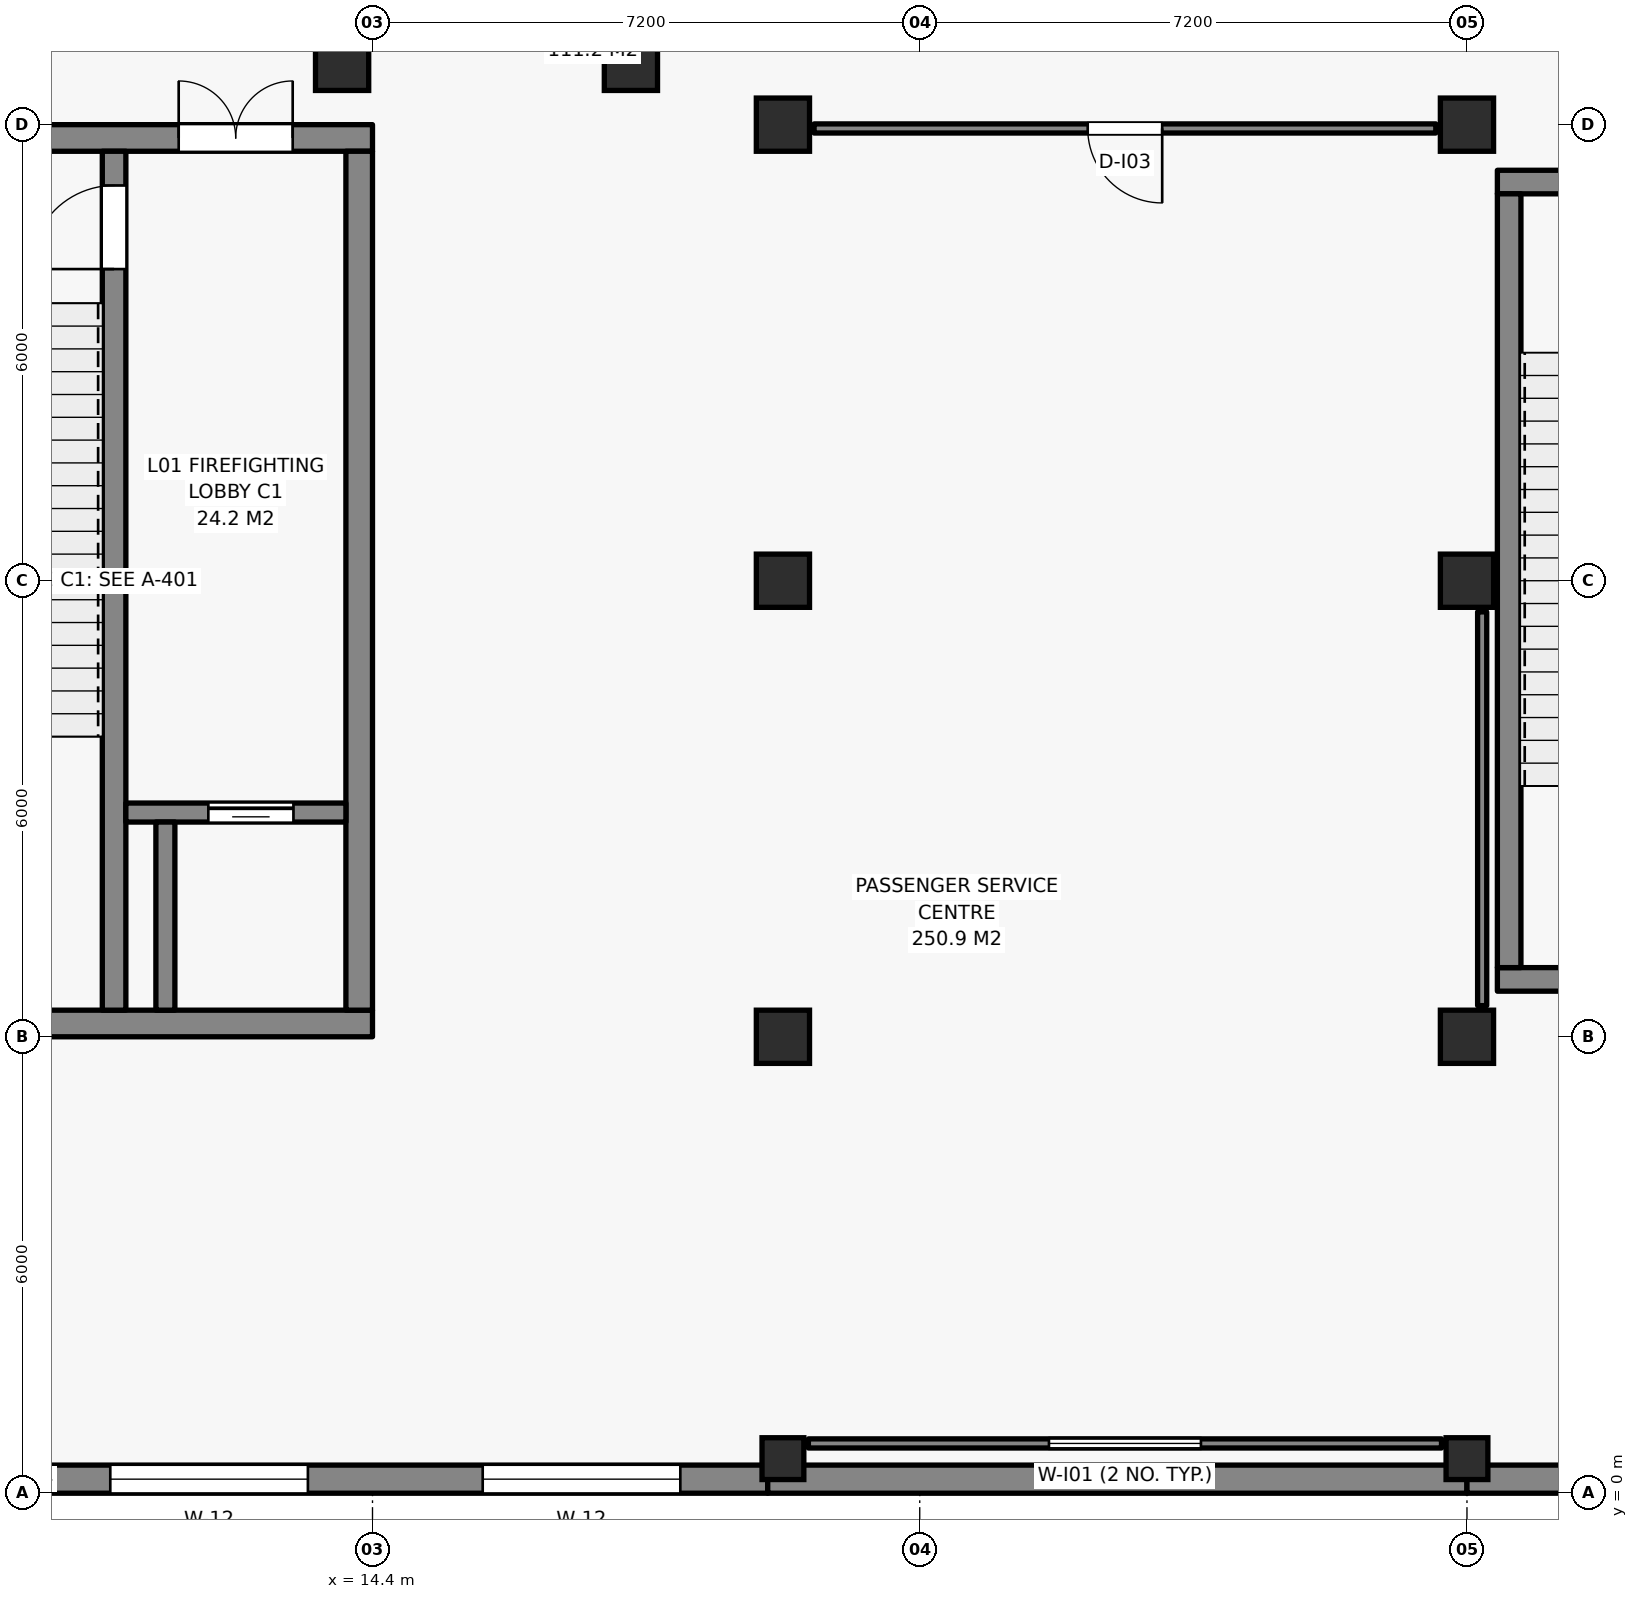
"""IFC4 building model, lengths in metres.
Left out: names, types, materials, properties, quantities, classifications, styles, units other than length and angle.
Written with IfcOpenShell. Run it as: python <this file> out.ifc"""

import sys

from ifc_helpers import new_model, si_unit, direction, frame, frame_2d, origin, origin_2d, place, context, subcontext, project, spatial, rectangle, extrude, element, fill, save


model = new_model("IFC4")
c1 = context("Model", 3, precision=1e-05, world=origin(), true_north=direction((0.0, 1.0)))
c2 = subcontext(c1, "Body", "Model", "MODEL_VIEW")
j1 = project(units=[si_unit("LENGTHUNIT", "METRE"), si_unit("PLANEANGLEUNIT", "RADIAN")], contexts=[c1])
p1 = place(None, origin())
s1 = spatial("IfcSite", under=j1, at=p1, CompositionType="ELEMENT")
p2 = place(p1, origin())
s2 = spatial("IfcBuilding", under=s1, at=p2, CompositionType="ELEMENT")
p3 = place(p2, origin())
s3 = spatial("IfcBuildingStorey", under=s2, at=p3, CompositionType="ELEMENT", Elevation=0.0)
p4 = place(p3, frame((7.2, 6.175, 0.0), z_axis=(0.0, 0.0, 1.0), x_axis=(1.0, 0.0, 0.0)))
e1 = element("IfcWall", 1, at=p4, inside=s3, PredefinedType="SHEAR", context=c2, shape_type="SweptSolid", body=[
    extrude(rectangle(XDim=7.2, YDim=0.35, at=frame_2d((3.6, 0.0))), origin(), (0.0, 0.0, 1.0), 5.75),
])
p5 = place(p3, frame((7.2, 17.825, 0.0), z_axis=(0.0, 0.0, 1.0), x_axis=(1.0, 0.0, 0.0)))
e2 = element("IfcWall", 2, at=p5, inside=s3, PredefinedType="SHEAR", context=c2, shape_type="SweptSolid", body=[
    extrude(rectangle(XDim=7.2, YDim=0.35, at=frame_2d((3.6, 0.0))), origin(), (0.0, 0.0, 1.0), 5.75),
])
p6 = place(p5, frame((4.65, 0.0, 0.0)))
e3 = element("IfcOpeningElement", 3, at=p6, cuts=e2, PredefinedType="OPENING", context=c2, shape_type="SweptSolid", body=[
    extrude(rectangle(XDim=1.5, YDim=2.15, at=frame_2d((0.75, 1.075))), frame((0.0, 0.185, 0.0), z_axis=(0.0, -1.0, 0.0), x_axis=(1.0, 0.0, 0.0)), (0.0, 0.0, 1.0), 0.37),
])
p7 = place(p3, frame((14.225, 6.35, 0.0), z_axis=(0.0, 0.0, 1.0), x_axis=(0.0, 1.0, 0.0)))
e4 = element("IfcWall", 4, at=p7, inside=s3, PredefinedType="SHEAR", context=c2, shape_type="SweptSolid", body=[
    extrude(rectangle(XDim=11.3, YDim=0.35, at=frame_2d((5.65, 0.0))), origin(), (0.0, 0.0, 1.0), 5.75),
])
p8 = place(p3, frame((11.0, 6.35, 0.0), z_axis=(0.0, 0.0, 1.0), x_axis=(0.0, 1.0, 0.0)))
e5 = element("IfcWall", 5, at=p8, inside=s3, PredefinedType="SHEAR", context=c2, shape_type="SweptSolid", body=[
    extrude(rectangle(XDim=11.3, YDim=0.31, at=frame_2d((5.65, 0.0))), origin(), (0.0, 0.0, 1.0), 5.75),
])
p9 = place(p8, frame((9.75, 0.0, 0.0)))
e6 = element("IfcOpeningElement", 6, at=p9, cuts=e5, PredefinedType="OPENING", context=c2, shape_type="SweptSolid", body=[
    extrude(rectangle(XDim=1.1, YDim=2.15, at=frame_2d((0.55, 1.075))), frame((0.0, 0.165, 0.0), z_axis=(0.0, -1.0, 0.0), x_axis=(1.0, 0.0, 0.0)), (0.0, 0.0, 1.0), 0.33),
])
p10 = place(p3, frame((29.2, 6.755, -0.4), z_axis=(0.0, 0.0, 1.0), x_axis=(1.0, 0.0, 0.0)))
e7 = element("IfcWall", 7, at=p10, inside=s3, PredefinedType="SHEAR", context=c2, shape_type="SweptSolid", body=[
    extrude(rectangle(XDim=4.8, YDim=0.31, at=frame_2d((2.4, 0.0))), origin(), (0.0, 0.0, 1.0), 6.15),
])
p11 = place(p3, frame((29.2, 17.245, -0.4), z_axis=(0.0, 0.0, 1.0), x_axis=(1.0, 0.0, 0.0)))
e8 = element("IfcWall", 8, at=p11, inside=s3, PredefinedType="SHEAR", context=c2, shape_type="SweptSolid", body=[
    extrude(rectangle(XDim=4.8, YDim=0.31, at=frame_2d((2.4, 0.0))), origin(), (0.0, 0.0, 1.0), 6.15),
])
p12 = place(p11, frame((1.5, 0.0, 0.4)))
e9 = element("IfcOpeningElement", 9, at=p12, cuts=e8, PredefinedType="OPENING", context=c2, shape_type="SweptSolid", body=[
    extrude(rectangle(XDim=1.8, YDim=2.15, at=frame_2d((0.9, 1.075))), frame((0.0, 0.165, 0.0), z_axis=(0.0, -1.0, 0.0), x_axis=(1.0, 0.0, 0.0)), (0.0, 0.0, 1.0), 0.33),
])
p13 = place(p3, frame((29.355, 6.91, -0.4), z_axis=(0.0, 0.0, 1.0), x_axis=(0.0, 1.0, 0.0)))
e10 = element("IfcWall", 10, at=p13, inside=s3, PredefinedType="SHEAR", context=c2, shape_type="SweptSolid", body=[
    extrude(rectangle(XDim=10.18, YDim=0.31, at=frame_2d((5.09, 0.0))), origin(), (0.0, 0.0, 1.0), 6.15),
])
p14 = place(p3, frame((19.8, 0.45, -0.4), z_axis=(0.0, 0.0, 1.0), x_axis=(1.0, 0.0, 0.0)))
e11 = element("IfcColumn", 11, at=p14, inside=s3, PredefinedType="PILASTER", context=c2, shape_type="SweptSolid", body=[
    extrude(rectangle(XDim=0.55, YDim=0.55, at=origin_2d()), origin(), (0.0, 0.0, 1.0), 6.4),
])
for number, where, z_axis, x_axis in (
    (12, (19.8, 6.0, -0.4), (0.0, 0.0, 1.0), (1.0, 0.0, 0.0)),
    (13, (19.8, 12.0, -0.4), (0.0, 0.0, 1.0), (1.0, 0.0, 0.0)),
    (14, (19.8, 18.0, -0.4), (0.0, 0.0, 1.0), (1.0, 0.0, 0.0)),
):
    element("IfcColumn", number, at=place(p3, frame(where, z_axis=z_axis, x_axis=x_axis)), inside=s3, PredefinedType="COLUMN", context=c2, shape_type="SweptSolid", body=[
        extrude(rectangle(XDim=0.7, YDim=0.7, at=origin_2d()), origin(), (0.0, 0.0, 1.0), 6.4),
    ])
p15 = place(p3, frame((28.8, 0.45, -0.4), z_axis=(0.0, 0.0, 1.0), x_axis=(1.0, 0.0, 0.0)))
e15 = element("IfcColumn", 15, at=p15, inside=s3, PredefinedType="PILASTER", context=c2, shape_type="SweptSolid", body=[
    extrude(rectangle(XDim=0.55, YDim=0.55, at=origin_2d()), origin(), (0.0, 0.0, 1.0), 6.4),
])
for number, where, z_axis, x_axis in (
    (16, (28.8, 6.0, -0.4), (0.0, 0.0, 1.0), (1.0, 0.0, 0.0)),
    (17, (28.8, 12.0, -0.4), (0.0, 0.0, 1.0), (1.0, 0.0, 0.0)),
    (18, (28.8, 18.0, -0.4), (0.0, 0.0, 1.0), (1.0, 0.0, 0.0)),
):
    element("IfcColumn", number, at=place(p3, frame(where, z_axis=z_axis, x_axis=x_axis)), inside=s3, PredefinedType="COLUMN", context=c2, shape_type="SweptSolid", body=[
        extrude(rectangle(XDim=0.7, YDim=0.7, at=origin_2d()), origin(), (0.0, 0.0, 1.0), 6.4),
    ])
for number, where, z_axis, x_axis in (
    (19, (14.0, 18.8, 0.0), (0.0, 0.0, 1.0), (1.0, 0.0, 0.0)),
    (20, (17.8, 18.8, 0.0), (0.0, 0.0, 1.0), (1.0, 0.0, 0.0)),
):
    element("IfcColumn", number, at=place(p3, frame(where, z_axis=z_axis, x_axis=x_axis)), inside=s3, PredefinedType="COLUMN", context=c2, shape_type="SweptSolid", body=[
        extrude(rectangle(XDim=0.7, YDim=0.7, at=origin_2d()), origin(), (0.0, 0.0, 1.0), 6.0),
    ])
p16 = place(p3, frame((0.0, 0.18, 0.0), z_axis=(0.0, 0.0, 1.0), x_axis=(1.0, 0.0, 0.0)))
e21 = element("IfcWall", 21, at=p16, inside=s3, PredefinedType="SOLIDWALL", context=c2, shape_type="SweptSolid", body=[
    extrude(rectangle(XDim=19.6, YDim=0.37, at=frame_2d((9.8, 0.0))), origin(), (0.0, 0.0, 1.0), 5.485),
])
p17 = place(p16, frame((1.15, 0.0, 0.82)))
e22 = element("IfcOpeningElement", 22, at=p17, cuts=e21, PredefinedType="OPENING", context=c2, shape_type="SweptSolid", body=[
    extrude(rectangle(XDim=2.6, YDim=2.65, at=frame_2d((1.3, 1.325))), frame((0.0, 0.195, 0.0), z_axis=(0.0, -1.0, 0.0), x_axis=(1.0, 0.0, 0.0)), (0.0, 0.0, 1.0), 0.39),
])
p18 = place(p16, frame((6.05, 0.0, 0.82)))
e23 = element("IfcOpeningElement", 23, at=p18, cuts=e21, PredefinedType="OPENING", context=c2, shape_type="SweptSolid", body=[
    extrude(rectangle(XDim=2.6, YDim=2.65, at=frame_2d((1.3, 1.325))), frame((0.0, 0.195, 0.0), z_axis=(0.0, -1.0, 0.0), x_axis=(1.0, 0.0, 0.0)), (0.0, 0.0, 1.0), 0.39),
])
p19 = place(p16, frame((10.95, 0.0, 0.82)))
e24 = element("IfcOpeningElement", 24, at=p19, cuts=e21, PredefinedType="OPENING", context=c2, shape_type="SweptSolid", body=[
    extrude(rectangle(XDim=2.6, YDim=2.65, at=frame_2d((1.3, 1.325))), frame((0.0, 0.195, 0.0), z_axis=(0.0, -1.0, 0.0), x_axis=(1.0, 0.0, 0.0)), (0.0, 0.0, 1.0), 0.39),
])
p20 = place(p16, frame((15.85, 0.0, 0.82)))
e25 = element("IfcOpeningElement", 25, at=p20, cuts=e21, PredefinedType="OPENING", context=c2, shape_type="SweptSolid", body=[
    extrude(rectangle(XDim=2.6, YDim=2.65, at=frame_2d((1.3, 1.325))), frame((0.0, 0.195, 0.0), z_axis=(0.0, -1.0, 0.0), x_axis=(1.0, 0.0, 0.0)), (0.0, 0.0, 1.0), 0.39),
])
p21 = place(p3, frame((19.6, 0.18, 0.0), z_axis=(0.0, 0.0, 1.0), x_axis=(1.0, 0.0, 0.0)))
e26 = element("IfcWall", 26, at=p21, inside=s3, PredefinedType="SOLIDWALL", context=c2, shape_type="SweptSolid", body=[
    extrude(rectangle(XDim=9.2, YDim=0.37, at=frame_2d((4.6, 0.0))), origin(), (0.0, 0.0, 1.0), 5.095),
])
p22 = place(p3, frame((28.8, 0.18, 0.0), z_axis=(0.0, 0.0, 1.0), x_axis=(1.0, 0.0, 0.0)))
e27 = element("IfcWall", 27, at=p22, inside=s3, PredefinedType="SOLIDWALL", context=c2, shape_type="SweptSolid", body=[
    extrude(rectangle(XDim=7.2, YDim=0.37, at=frame_2d((3.6, 0.0))), origin(), (0.0, 0.0, 1.0), 5.75),
])
p23 = place(p22, frame((2.3, 0.0, 0.82)))
e28 = element("IfcOpeningElement", 28, at=p23, cuts=e27, PredefinedType="OPENING", context=c2, shape_type="SweptSolid", body=[
    extrude(rectangle(XDim=2.6, YDim=2.65, at=frame_2d((1.3, 1.325))), frame((0.0, 0.195, 0.0), z_axis=(0.0, -1.0, 0.0), x_axis=(1.0, 0.0, 0.0)), (0.0, 0.0, 1.0), 0.39),
])
p24 = place(p3, frame((11.155, 8.95, 0.0), z_axis=(0.0, 0.0, 1.0), x_axis=(1.0, 0.0, 0.0)))
e29 = element("IfcWall", 29, at=p24, inside=s3, PredefinedType="SHEAR", context=c2, shape_type="SweptSolid", body=[
    extrude(rectangle(XDim=2.895, YDim=0.25, at=frame_2d((1.448, 0.0))), origin(), (0.0, 0.0, 1.0), 5.75),
])
p25 = place(p24, frame((1.085, 0.0, 0.0)))
e30 = element("IfcOpeningElement", 30, at=p25, cuts=e29, PredefinedType="OPENING", context=c2, shape_type="SweptSolid", body=[
    extrude(rectangle(XDim=1.12, YDim=2.15, at=frame_2d((0.56, 1.075))), frame((0.0, 0.135, 0.0), z_axis=(0.0, -1.0, 0.0), x_axis=(1.0, 0.0, 0.0)), (0.0, 0.0, 1.0), 0.27),
])
p26 = place(p3, frame((11.675, 6.35, 0.0), z_axis=(0.0, 0.0, 1.0), x_axis=(0.0, 1.0, 0.0)))
e31 = element("IfcWall", 31, at=p26, inside=s3, PredefinedType="SHEAR", context=c2, shape_type="SweptSolid", body=[
    extrude(rectangle(XDim=2.475, YDim=0.25, at=frame_2d((1.237, 0.0))), origin(), (0.0, 0.0, 1.0), 5.75),
])
p27 = place(p3, frame((20.135, 0.65, 0.0), z_axis=(0.0, 0.0, 1.0), x_axis=(1.0, 0.0, 0.0)))
e32 = element("IfcWall", 32, at=p27, inside=s3, PredefinedType="PARTITIONING", context=c2, shape_type="SweptSolid", body=[
    extrude(rectangle(XDim=8.33, YDim=0.12, at=frame_2d((4.165, 0.0))), origin(), (0.0, 0.0, 1.0), 5.095),
])
p28 = place(p27, frame((3.165, 0.0, 1.05)))
e33 = element("IfcOpeningElement", 33, at=p28, cuts=e32, PredefinedType="OPENING", context=c2, shape_type="SweptSolid", body=[
    extrude(rectangle(XDim=2.0, YDim=1.2, at=frame_2d((1.0, 0.6))), frame((0.0, 0.07, 0.0), z_axis=(0.0, -1.0, 0.0), x_axis=(1.0, 0.0, 0.0)), (0.0, 0.0, 1.0), 0.14),
])
p29 = place(p3, frame((29.0, 6.41, 0.0), z_axis=(0.0, 0.0, 1.0), x_axis=(0.0, 1.0, 0.0)))
e34 = element("IfcWall", 34, at=p29, inside=s3, PredefinedType="PARTITIONING", context=c2, shape_type="SweptSolid", body=[
    extrude(rectangle(XDim=5.18, YDim=0.12, at=frame_2d((2.59, 0.0))), origin(), (0.0, 0.0, 1.0), 5.345),
])
p30 = place(p3, frame((28.39, 17.95, 0.0), z_axis=(0.0, 0.0, 1.0), x_axis=(-1.0, 0.0, 0.0)))
e35 = element("IfcWall", 35, at=p30, inside=s3, PredefinedType="PARTITIONING", context=c2, shape_type="SweptSolid", body=[
    extrude(rectangle(XDim=8.18, YDim=0.12, at=frame_2d((4.09, 0.0))), origin(), (0.0, 0.0, 1.0), 5.095),
])
p31 = place(p30, frame((3.6, 0.0, 0.0)))
e36 = element("IfcOpeningElement", 36, at=p31, cuts=e35, PredefinedType="OPENING", context=c2, shape_type="SweptSolid", body=[
    extrude(rectangle(XDim=0.98, YDim=2.15, at=frame_2d((0.49, 1.075))), frame((0.0, 0.07, 0.0), z_axis=(0.0, -1.0, 0.0), x_axis=(1.0, 0.0, 0.0)), (0.0, 0.0, 1.0), 0.14),
])
p32 = place(p19, origin())
e37 = element("IfcWindow", 37, at=p32, inside=s3, PartitioningType="SINGLE_PANEL", PredefinedType="WINDOW", context=c2, shape_type="SweptSolid", body=[
    extrude(rectangle(XDim=2.6, YDim=2.65, at=frame_2d((1.3, 1.325))), frame((0.0, 0.03, 0.0), z_axis=(0.0, -1.0, 0.0), x_axis=(1.0, 0.0, 0.0)), (0.0, 0.0, 1.0), 0.06),
])
fill(e24, e37)
p33 = place(p20, origin())
e38 = element("IfcWindow", 38, at=p33, inside=s3, PartitioningType="SINGLE_PANEL", PredefinedType="WINDOW", context=c2, shape_type="SweptSolid", body=[
    extrude(rectangle(XDim=2.6, YDim=2.65, at=frame_2d((1.3, 1.325))), frame((0.0, 0.03, 0.0), z_axis=(0.0, -1.0, 0.0), x_axis=(1.0, 0.0, 0.0)), (0.0, 0.0, 1.0), 0.06),
])
fill(e25, e38)
p34 = place(p25, origin())
e39 = element("IfcDoor", 39, at=p34, inside=s3, OperationType="SLIDING_TO_LEFT", PredefinedType="DOOR", context=c2, shape_type="SweptSolid", body=[
    extrude(rectangle(XDim=1.12, YDim=2.15, at=frame_2d((0.56, 1.075))), frame((0.0, 0.025, 0.0), z_axis=(0.0, -1.0, 0.0), x_axis=(1.0, 0.0, 0.0)), (0.0, 0.0, 1.0), 0.05),
])
fill(e30, e39)
p35 = place(p6, origin())
e40 = element("IfcDoor", 40, at=p35, inside=s3, OperationType="DOUBLE_DOOR_SINGLE_SWING", PredefinedType="DOOR", context=c2, shape_type="SweptSolid", body=[
    extrude(rectangle(XDim=1.5, YDim=2.15, at=frame_2d((0.75, 1.075))), frame((0.0, 0.025, 0.0), z_axis=(0.0, -1.0, 0.0), x_axis=(1.0, 0.0, 0.0)), (0.0, 0.0, 1.0), 0.05),
])
fill(e3, e40)
p36 = place(p9, origin())
e41 = element("IfcDoor", 41, at=p36, inside=s3, OperationType="SINGLE_SWING_LEFT", PredefinedType="DOOR", context=c2, shape_type="SweptSolid", body=[
    extrude(rectangle(XDim=1.1, YDim=2.15, at=frame_2d((0.55, 1.075))), frame((0.0, 0.025, 0.0), z_axis=(0.0, -1.0, 0.0), x_axis=(1.0, 0.0, 0.0)), (0.0, 0.0, 1.0), 0.05),
])
fill(e6, e41)
p37 = place(p31, origin())
e42 = element("IfcDoor", 42, at=p37, inside=s3, OperationType="SINGLE_SWING_LEFT", PredefinedType="DOOR", context=c2, shape_type="SweptSolid", body=[
    extrude(rectangle(XDim=0.98, YDim=2.15, at=frame_2d((0.49, 1.075))), frame((0.0, 0.025, 0.0), z_axis=(0.0, -1.0, 0.0), x_axis=(1.0, 0.0, 0.0)), (0.0, 0.0, 1.0), 0.05),
])
fill(e36, e42)
p38 = place(p28, origin())
e43 = element("IfcWindow", 43, at=p38, inside=s3, PartitioningType="SINGLE_PANEL", PredefinedType="WINDOW", context=c2, shape_type="SweptSolid", body=[
    extrude(rectangle(XDim=2.0, YDim=1.2, at=frame_2d((1.0, 0.6))), frame((0.0, 0.03, 0.0), z_axis=(0.0, -1.0, 0.0), x_axis=(1.0, 0.0, 0.0)), (0.0, 0.0, 1.0), 0.06),
])
fill(e33, e43)
save(model, sys.argv[1])
